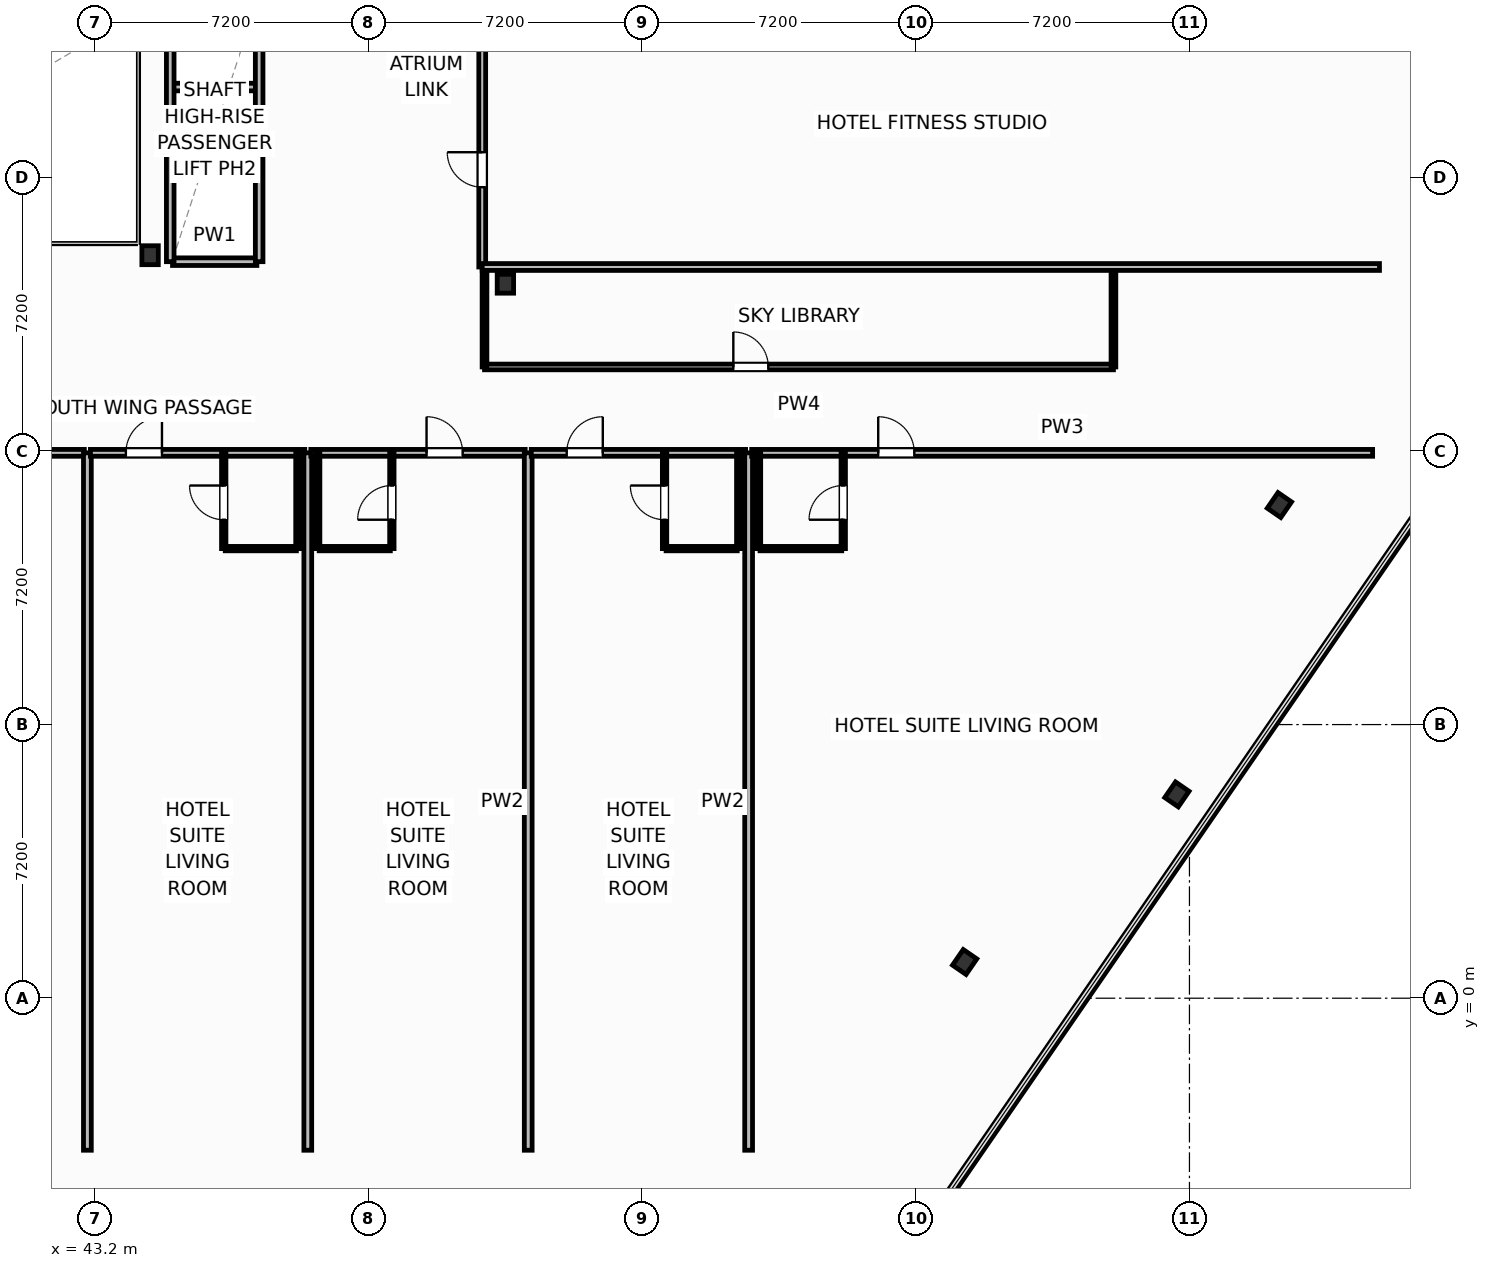
"""IFC4 building model, lengths in metres.
Left out: names, types, materials, properties, quantities, classifications, styles, units other than length and angle.
Written with IfcOpenShell. Run it as: python <this file> out.ifc"""

import sys

from ifc_helpers import new_model, si_unit, direction, frame, frame_2d, origin, origin_2d, place, context, subcontext, project, spatial, rectangle, i_section, extrude, element, fill, save


model = new_model("IFC4")
c1 = context("Model", 3, precision=1e-05, world=origin(), true_north=direction((0.0, 1.0)))
c2 = subcontext(c1, "Body", "Model", "MODEL_VIEW")
j1 = project(units=[si_unit("LENGTHUNIT", "METRE"), si_unit("PLANEANGLEUNIT", "RADIAN")], contexts=[c1])
p1 = place(None, origin())
s1 = spatial("IfcSite", under=j1, at=p1, CompositionType="ELEMENT")
p2 = place(p1, origin())
s2 = spatial("IfcBuilding", under=s1, at=p2, CompositionType="ELEMENT")
p3 = place(p2, frame((0.0, 0.0, 64.0)))
s3 = spatial("IfcBuildingStorey", under=s2, at=p3, CompositionType="ELEMENT", Elevation=64.0)
for number, where, z_axis, x_axis in (
    (1, (44.65, 19.55, 0.0), (0.0, 0.0, 1.0), (1.0, 0.0, 0.0)),
    (2, (54.0, 18.8, 0.0), (0.0, 0.0, 1.0), (1.0, 0.0, 0.0)),
    (3, (66.085, 0.953, 0.0), (0.0, 0.0, 1.0), (0.824, -0.567, 0.0)),
    (4, (71.67, 5.363, 0.0), (0.0, 0.0, 1.0), (0.824, -0.567, 0.0)),
    (5, (74.367, 12.976, 0.0), (0.0, 0.0, 1.0), (0.824, -0.567, 0.0)),
):
    element("IfcColumn", number, at=place(p3, frame(where, z_axis=z_axis, x_axis=x_axis)), inside=s3, PredefinedType="COLUMN", context=c2, shape_type="SweptSolid", body=[
        extrude(i_section(OverallWidth=0.432, OverallDepth=0.498, WebThickness=0.056, FlangeThickness=0.089, FilletRadius=0.025, at=origin_2d()), origin(), (0.0, 0.0, 1.0), 3.7),
    ])
p4 = place(p3, frame((33.518, -1.362, 0.0), z_axis=(0.0, 0.0, 1.0), x_axis=(0.82353935489, -0.567259139148, 0.0)))
e6 = element("IfcWall", 6, at=p4, inside=s3, PredefinedType="SOLIDWALL", context=c2, shape_type="SweptSolid", body=[
    extrude(rectangle(XDim=23.147, YDim=0.22, at=frame_2d((11.573, 0.0))), origin(), (0.0, 0.0, 1.0), 2.73),
])
p5 = place(p4, frame((10.749, 0.0, 0.8)))
e7 = element("IfcOpeningElement", 7, at=p5, cuts=e6, PredefinedType="OPENING", context=c2, shape_type="SweptSolid", body=[
    extrude(rectangle(XDim=1.65, YDim=1.65, at=frame_2d((0.825, 0.825))), frame((0.0, 0.12, 0.0), z_axis=(0.0, -1.0, 0.0), x_axis=(1.0, 0.0, 0.0)), (0.0, 0.0, 1.0), 0.24),
])
p6 = place(p3, frame((53.45, 16.61, 0.0), z_axis=(0.0, 0.0, 1.0), x_axis=(1.0, 0.0, 0.0)))
e8 = element("IfcWall", 8, at=p6, inside=s3, PredefinedType="PARTITIONING", context=c2, shape_type="SweptSolid", body=[
    extrude(rectangle(XDim=16.55, YDim=0.15, at=frame_2d((8.275, 0.0))), origin(), (0.0, 0.0, 1.0), 2.58),
])
p7 = place(p6, frame((6.548, 0.0, 0.0)))
e9 = element("IfcOpeningElement", 9, at=p7, cuts=e8, PredefinedType="OPENING", context=c2, shape_type="SweptSolid", body=[
    extrude(rectangle(XDim=0.92, YDim=2.05, at=frame_2d((0.46, 1.025))), frame((0.0, 0.085, 0.0), z_axis=(0.0, -1.0, 0.0), x_axis=(1.0, 0.0, 0.0)), (0.0, 0.0, 1.0), 0.17),
])
for number, where, z_axis, x_axis in (
    (10, (53.45, 16.61, 0.0), (0.0, 0.0, 1.0), (0.0, 1.0, 0.0)),
    (11, (70.0, 16.61, 0.0), (0.0, 0.0, 1.0), (0.0, 1.0, 0.0)),
):
    element("IfcWall", number, at=place(p3, frame(where, z_axis=z_axis, x_axis=x_axis)), inside=s3, PredefinedType="PARTITIONING", context=c2, shape_type="SweptSolid", body=[
        extrude(rectangle(XDim=2.63, YDim=0.125, at=frame_2d((1.315, 0.0))), origin(), (0.0, 0.0, 1.0), 3.45),
    ])
p8 = place(p3, frame((37.28, 14.35, 0.0), z_axis=(0.0, 0.0, 1.0), x_axis=(1.0, 0.0, 0.0)))
e12 = element("IfcWall", 12, at=p8, inside=s3, PredefinedType="PARTITIONING", context=c2, shape_type="SweptSolid", body=[
    extrude(rectangle(XDim=5.64, YDim=0.18, at=frame_2d((2.82, 0.0))), origin(), (0.0, 0.0, 1.0), 3.45),
])
p9 = place(p8, frame((3.045, 0.0, 0.0)))
e13 = element("IfcOpeningElement", 13, at=p9, cuts=e12, PredefinedType="OPENING", context=c2, shape_type="SweptSolid", body=[
    extrude(rectangle(XDim=0.95, YDim=2.15, at=frame_2d((0.475, 1.075))), frame((0.0, 0.1, 0.0), z_axis=(0.0, -1.0, 0.0), x_axis=(1.0, 0.0, 0.0)), (0.0, 0.0, 1.0), 0.2),
])
p10 = place(p3, frame((43.0, -4.0, 0.0), z_axis=(0.0, 0.0, 1.0), x_axis=(0.0, 1.0, 0.0)))
e14 = element("IfcWall", 14, at=p10, inside=s3, PredefinedType="PARTITIONING", context=c2, shape_type="SweptSolid", body=[
    extrude(rectangle(XDim=18.35, YDim=0.205, at=frame_2d((9.175, 0.0))), origin(), (0.0, 0.0, 1.0), 2.58),
])
p11 = place(p3, frame((43.08, 14.35, 0.0), z_axis=(0.0, 0.0, 1.0), x_axis=(1.0, 0.0, 0.0)))
e15 = element("IfcWall", 15, at=p11, inside=s3, PredefinedType="PARTITIONING", context=c2, shape_type="SweptSolid", body=[
    extrude(rectangle(XDim=5.64, YDim=0.18, at=frame_2d((2.82, 0.0))), origin(), (0.0, 0.0, 1.0), 3.45),
])
p12 = place(p11, frame((0.933, 0.0, 0.0)))
e16 = element("IfcOpeningElement", 16, at=p12, cuts=e15, PredefinedType="OPENING", context=c2, shape_type="SweptSolid", body=[
    extrude(rectangle(XDim=0.95, YDim=2.15, at=frame_2d((0.475, 1.075))), frame((0.0, 0.1, 0.0), z_axis=(0.0, -1.0, 0.0), x_axis=(1.0, 0.0, 0.0)), (0.0, 0.0, 1.0), 0.2),
])
p13 = place(p3, frame((46.628, 11.83, 0.0), z_axis=(0.0, 0.0, 1.0), x_axis=(1.0, 0.0, 0.0)))
e17 = element("IfcWall", 17, at=p13, inside=s3, PredefinedType="PARTITIONING", context=c2, shape_type="SweptSolid", body=[
    extrude(rectangle(XDim=1.872, YDim=0.115, at=frame_2d((0.936, 0.0))), origin(), (0.0, 0.0, 1.0), 3.45),
])
p14 = place(p3, frame((46.588, 11.83, 0.0), z_axis=(0.0, 0.0, 1.0), x_axis=(0.0, 1.0, 0.0)))
e18 = element("IfcWall", 18, at=p14, inside=s3, PredefinedType="PARTITIONING", context=c2, shape_type="SweptSolid", body=[
    extrude(rectangle(XDim=2.52, YDim=0.115, at=frame_2d((1.26, 0.0))), origin(), (0.0, 0.0, 1.0), 3.45),
])
p15 = place(p14, frame((0.76, 0.0, 0.0)))
e19 = element("IfcOpeningElement", 19, at=p15, cuts=e18, PredefinedType="OPENING", context=c2, shape_type="SweptSolid", body=[
    extrude(rectangle(XDim=0.9, YDim=2.05, at=frame_2d((0.45, 1.025))), frame((0.0, 0.067, 0.0), z_axis=(0.0, -1.0, 0.0), x_axis=(1.0, 0.0, 0.0)), (0.0, 0.0, 1.0), 0.135),
])
p16 = place(p3, frame((48.54, 11.83, 0.0), z_axis=(0.0, 0.0, 1.0), x_axis=(0.0, 1.0, 0.0)))
e20 = element("IfcWall", 20, at=p16, inside=s3, PredefinedType="PARTITIONING", context=c2, shape_type="SweptSolid", body=[
    extrude(rectangle(XDim=2.52, YDim=0.115, at=frame_2d((1.26, 0.0))), origin(), (0.0, 0.0, 1.0), 3.45),
])
p17 = place(p3, frame((48.8, -4.0, 0.0), z_axis=(0.0, 0.0, 1.0), x_axis=(0.0, 1.0, 0.0)))
e21 = element("IfcWall", 21, at=p17, inside=s3, PredefinedType="PARTITIONING", context=c2, shape_type="SweptSolid", body=[
    extrude(rectangle(XDim=18.35, YDim=0.205, at=frame_2d((9.175, 0.0))), origin(), (0.0, 0.0, 1.0), 3.45),
])
p18 = place(p3, frame((48.88, 14.35, 0.0), z_axis=(0.0, 0.0, 1.0), x_axis=(1.0, 0.0, 0.0)))
e22 = element("IfcWall", 22, at=p18, inside=s3, PredefinedType="PARTITIONING", context=c2, shape_type="SweptSolid", body=[
    extrude(rectangle(XDim=5.64, YDim=0.18, at=frame_2d((2.82, 0.0))), origin(), (0.0, 0.0, 1.0), 3.45),
])
p19 = place(p18, frame((3.045, 0.0, 0.0)))
e23 = element("IfcOpeningElement", 23, at=p19, cuts=e22, PredefinedType="OPENING", context=c2, shape_type="SweptSolid", body=[
    extrude(rectangle(XDim=0.95, YDim=2.15, at=frame_2d((0.475, 1.075))), frame((0.0, 0.1, 0.0), z_axis=(0.0, -1.0, 0.0), x_axis=(1.0, 0.0, 0.0)), (0.0, 0.0, 1.0), 0.2),
])
p20 = place(p3, frame((49.1, 11.83, 0.0), z_axis=(0.0, 0.0, 1.0), x_axis=(1.0, 0.0, 0.0)))
e24 = element("IfcWall", 24, at=p20, inside=s3, PredefinedType="PARTITIONING", context=c2, shape_type="SweptSolid", body=[
    extrude(rectangle(XDim=1.872, YDim=0.115, at=frame_2d((0.936, 0.0))), origin(), (0.0, 0.0, 1.0), 3.45),
])
p21 = place(p3, frame((51.012, 11.83, 0.0), z_axis=(0.0, 0.0, 1.0), x_axis=(0.0, 1.0, 0.0)))
e25 = element("IfcWall", 25, at=p21, inside=s3, PredefinedType="PARTITIONING", context=c2, shape_type="SweptSolid", body=[
    extrude(rectangle(XDim=2.52, YDim=0.115, at=frame_2d((1.26, 0.0))), origin(), (0.0, 0.0, 1.0), 3.45),
])
p22 = place(p21, frame((0.76, 0.0, 0.0)))
e26 = element("IfcOpeningElement", 26, at=p22, cuts=e25, PredefinedType="OPENING", context=c2, shape_type="SweptSolid", body=[
    extrude(rectangle(XDim=0.9, YDim=2.05, at=frame_2d((0.45, 1.025))), frame((0.0, 0.067, 0.0), z_axis=(0.0, -1.0, 0.0), x_axis=(1.0, 0.0, 0.0)), (0.0, 0.0, 1.0), 0.135),
])
p23 = place(p3, frame((49.06, 11.83, 0.0), z_axis=(0.0, 0.0, 1.0), x_axis=(0.0, 1.0, 0.0)))
e27 = element("IfcWall", 27, at=p23, inside=s3, PredefinedType="PARTITIONING", context=c2, shape_type="SweptSolid", body=[
    extrude(rectangle(XDim=2.52, YDim=0.115, at=frame_2d((1.26, 0.0))), origin(), (0.0, 0.0, 1.0), 3.45),
])
p24 = place(p3, frame((54.6, -4.0, 0.0), z_axis=(0.0, 0.0, 1.0), x_axis=(0.0, 1.0, 0.0)))
e28 = element("IfcWall", 28, at=p24, inside=s3, PredefinedType="PARTITIONING", context=c2, shape_type="SweptSolid", body=[
    extrude(rectangle(XDim=18.35, YDim=0.205, at=frame_2d((9.175, 0.0))), origin(), (0.0, 0.0, 1.0), 3.45),
])
p25 = place(p3, frame((54.68, 14.35, 0.0), z_axis=(0.0, 0.0, 1.0), x_axis=(1.0, 0.0, 0.0)))
e29 = element("IfcWall", 29, at=p25, inside=s3, PredefinedType="PARTITIONING", context=c2, shape_type="SweptSolid", body=[
    extrude(rectangle(XDim=5.64, YDim=0.18, at=frame_2d((2.82, 0.0))), origin(), (0.0, 0.0, 1.0), 3.45),
])
p26 = place(p25, frame((0.933, 0.0, 0.0)))
e30 = element("IfcOpeningElement", 30, at=p26, cuts=e29, PredefinedType="OPENING", context=c2, shape_type="SweptSolid", body=[
    extrude(rectangle(XDim=0.95, YDim=2.15, at=frame_2d((0.475, 1.075))), frame((0.0, 0.1, 0.0), z_axis=(0.0, -1.0, 0.0), x_axis=(1.0, 0.0, 0.0)), (0.0, 0.0, 1.0), 0.2),
])
p27 = place(p3, frame((58.228, 11.83, 0.0), z_axis=(0.0, 0.0, 1.0), x_axis=(1.0, 0.0, 0.0)))
e31 = element("IfcWall", 31, at=p27, inside=s3, PredefinedType="PARTITIONING", context=c2, shape_type="SweptSolid", body=[
    extrude(rectangle(XDim=1.872, YDim=0.115, at=frame_2d((0.936, 0.0))), origin(), (0.0, 0.0, 1.0), 3.45),
])
p28 = place(p3, frame((58.188, 11.83, 0.0), z_axis=(0.0, 0.0, 1.0), x_axis=(0.0, 1.0, 0.0)))
e32 = element("IfcWall", 32, at=p28, inside=s3, PredefinedType="PARTITIONING", context=c2, shape_type="SweptSolid", body=[
    extrude(rectangle(XDim=2.52, YDim=0.115, at=frame_2d((1.26, 0.0))), origin(), (0.0, 0.0, 1.0), 3.45),
])
p29 = place(p28, frame((0.76, 0.0, 0.0)))
e33 = element("IfcOpeningElement", 33, at=p29, cuts=e32, PredefinedType="OPENING", context=c2, shape_type="SweptSolid", body=[
    extrude(rectangle(XDim=0.9, YDim=2.05, at=frame_2d((0.45, 1.025))), frame((0.0, 0.067, 0.0), z_axis=(0.0, -1.0, 0.0), x_axis=(1.0, 0.0, 0.0)), (0.0, 0.0, 1.0), 0.135),
])
p30 = place(p3, frame((60.14, 11.83, 0.0), z_axis=(0.0, 0.0, 1.0), x_axis=(0.0, 1.0, 0.0)))
e34 = element("IfcWall", 34, at=p30, inside=s3, PredefinedType="PARTITIONING", context=c2, shape_type="SweptSolid", body=[
    extrude(rectangle(XDim=2.52, YDim=0.115, at=frame_2d((1.26, 0.0))), origin(), (0.0, 0.0, 1.0), 3.45),
])
p31 = place(p3, frame((60.4, -4.0, 0.0), z_axis=(0.0, 0.0, 1.0), x_axis=(0.0, 1.0, 0.0)))
e35 = element("IfcWall", 35, at=p31, inside=s3, PredefinedType="PARTITIONING", context=c2, shape_type="SweptSolid", body=[
    extrude(rectangle(XDim=18.35, YDim=0.205, at=frame_2d((9.175, 0.0))), origin(), (0.0, 0.0, 1.0), 3.45),
])
p32 = place(p3, frame((60.48, 14.35, 0.0), z_axis=(0.0, 0.0, 1.0), x_axis=(1.0, 0.0, 0.0)))
e36 = element("IfcWall", 36, at=p32, inside=s3, PredefinedType="PARTITIONING", context=c2, shape_type="SweptSolid", body=[
    extrude(rectangle(XDim=16.34, YDim=0.18, at=frame_2d((8.17, 0.0))), origin(), (0.0, 0.0, 1.0), 2.58),
])
p33 = place(p32, frame((3.33, 0.0, 0.0)))
e37 = element("IfcOpeningElement", 37, at=p33, cuts=e36, PredefinedType="OPENING", context=c2, shape_type="SweptSolid", body=[
    extrude(rectangle(XDim=0.95, YDim=2.15, at=frame_2d((0.475, 1.075))), frame((0.0, 0.1, 0.0), z_axis=(0.0, -1.0, 0.0), x_axis=(1.0, 0.0, 0.0)), (0.0, 0.0, 1.0), 0.2),
])
p34 = place(p3, frame((60.7, 11.83, 0.0), z_axis=(0.0, 0.0, 1.0), x_axis=(1.0, 0.0, 0.0)))
e38 = element("IfcWall", 38, at=p34, inside=s3, PredefinedType="PARTITIONING", context=c2, shape_type="SweptSolid", body=[
    extrude(rectangle(XDim=2.15, YDim=0.115, at=frame_2d((1.075, 0.0))), origin(), (0.0, 0.0, 1.0), 3.45),
])
p35 = place(p3, frame((62.89, 11.83, 0.0), z_axis=(0.0, 0.0, 1.0), x_axis=(0.0, 1.0, 0.0)))
e39 = element("IfcWall", 39, at=p35, inside=s3, PredefinedType="PARTITIONING", context=c2, shape_type="SweptSolid", body=[
    extrude(rectangle(XDim=2.52, YDim=0.115, at=frame_2d((1.26, 0.0))), origin(), (0.0, 0.0, 1.0), 3.45),
])
p36 = place(p35, frame((0.76, 0.0, 0.0)))
e40 = element("IfcOpeningElement", 40, at=p36, cuts=e39, PredefinedType="OPENING", context=c2, shape_type="SweptSolid", body=[
    extrude(rectangle(XDim=0.9, YDim=2.05, at=frame_2d((0.45, 1.025))), frame((0.0, 0.067, 0.0), z_axis=(0.0, -1.0, 0.0), x_axis=(1.0, 0.0, 0.0)), (0.0, 0.0, 1.0), 0.135),
])
p37 = place(p3, frame((60.66, 11.83, 0.0), z_axis=(0.0, 0.0, 1.0), x_axis=(0.0, 1.0, 0.0)))
e41 = element("IfcWall", 41, at=p37, inside=s3, PredefinedType="PARTITIONING", context=c2, shape_type="SweptSolid", body=[
    extrude(rectangle(XDim=2.52, YDim=0.115, at=frame_2d((1.26, 0.0))), origin(), (0.0, 0.0, 1.0), 3.45),
])
p38 = place(p3, frame((53.39, 19.24, 0.0), z_axis=(0.0, 0.0, 1.0), x_axis=(0.0, 1.0, 0.0)))
e42 = element("IfcWall", 42, at=p38, inside=s3, PredefinedType="PARTITIONING", context=c2, shape_type="SweptSolid", body=[
    extrude(rectangle(XDim=7.52, YDim=0.18, at=frame_2d((3.76, 0.0))), origin(), (0.0, 0.0, 1.0), 3.45),
])
p39 = place(p38, frame((2.1, 0.0, 0.0)))
e43 = element("IfcOpeningElement", 43, at=p39, cuts=e42, PredefinedType="OPENING", context=c2, shape_type="SweptSolid", body=[
    extrude(rectangle(XDim=0.92, YDim=2.05, at=frame_2d((0.46, 1.025))), frame((0.0, 0.1, 0.0), z_axis=(0.0, -1.0, 0.0), x_axis=(1.0, 0.0, 0.0)), (0.0, 0.0, 1.0), 0.2),
])
p40 = place(p3, frame((53.39, 19.24, 0.0), z_axis=(0.0, 0.0, 1.0), x_axis=(1.0, 0.0, 0.0)))
e44 = element("IfcWall", 44, at=p40, inside=s3, PredefinedType="PARTITIONING", context=c2, shape_type="SweptSolid", body=[
    extrude(rectangle(XDim=23.61, YDim=0.18, at=frame_2d((11.805, 0.0))), origin(), (0.0, 0.0, 1.0), 3.45),
])
for number, where, z_axis, x_axis in (
    (45, (45.24, 21.675, 0.0), (0.0, 0.0, 1.0), (1.0, 0.0, 0.0)),
    (46, (45.24, 23.975, 0.0), (0.0, 0.0, 1.0), (1.0, 0.0, 0.0)),
):
    element("IfcWall", number, at=place(p3, frame(where, z_axis=z_axis, x_axis=x_axis)), inside=s3, PredefinedType="PARTITIONING", context=c2, shape_type="SweptSolid", body=[
        extrude(rectangle(XDim=2.22, YDim=0.2, at=frame_2d((1.11, 0.0))), origin(), (0.0, 0.0, 1.0), 3.45),
    ])
p41 = place(p3, frame((45.24, 19.38, 0.0), z_axis=(0.0, 0.0, 1.0), x_axis=(1.0, 0.0, 0.0)))
e47 = element("IfcWall", 47, at=p41, inside=s3, PredefinedType="PARTITIONING", context=c2, shape_type="SweptSolid", body=[
    extrude(rectangle(XDim=2.22, YDim=0.2, at=frame_2d((1.11, 0.0))), origin(), (0.0, 0.0, 1.0), 2.662),
])
for number, where, z_axis, x_axis in (
    (48, (45.18, 19.38, 0.0), (0.0, 0.0, 1.0), (0.0, 1.0, 0.0)),
    (49, (47.52, 19.38, 0.0), (0.0, 0.0, 1.0), (0.0, 1.0, 0.0)),
):
    element("IfcWall", number, at=place(p3, frame(where, z_axis=z_axis, x_axis=x_axis)), inside=s3, PredefinedType="PARTITIONING", context=c2, shape_type="SweptSolid", body=[
        extrude(rectangle(XDim=6.9, YDim=0.2, at=frame_2d((3.45, 0.0))), origin(), (0.0, 0.0, 1.0), 3.45),
    ])
p42 = place(p7, origin())
e50 = element("IfcDoor", 50, at=p42, inside=s3, OperationType="SINGLE_SWING_LEFT", PredefinedType="DOOR", context=c2, shape_type="SweptSolid", body=[
    extrude(rectangle(XDim=0.92, YDim=2.05, at=frame_2d((0.46, 1.025))), frame((0.0, 0.025, 0.0), z_axis=(0.0, -1.0, 0.0), x_axis=(1.0, 0.0, 0.0)), (0.0, 0.0, 1.0), 0.05),
])
fill(e9, e50)
p43 = place(p12, origin())
e51 = element("IfcDoor", 51, at=p43, inside=s3, OperationType="SINGLE_SWING_RIGHT", PredefinedType="DOOR", context=c2, shape_type="SweptSolid", body=[
    extrude(rectangle(XDim=0.95, YDim=2.15, at=frame_2d((0.475, 1.075))), frame((0.0, 0.025, 0.0), z_axis=(0.0, -1.0, 0.0), x_axis=(1.0, 0.0, 0.0)), (0.0, 0.0, 1.0), 0.05),
])
fill(e16, e51)
p44 = place(p15, origin())
e52 = element("IfcDoor", 52, at=p44, inside=s3, OperationType="SINGLE_SWING_RIGHT", PredefinedType="DOOR", context=c2, shape_type="SweptSolid", body=[
    extrude(rectangle(XDim=0.9, YDim=2.05, at=frame_2d((0.45, 1.025))), frame((0.0, 0.025, 0.0), z_axis=(0.0, -1.0, 0.0), x_axis=(1.0, 0.0, 0.0)), (0.0, 0.0, 1.0), 0.05),
])
fill(e19, e52)
p45 = place(p19, origin())
e53 = element("IfcDoor", 53, at=p45, inside=s3, OperationType="SINGLE_SWING_LEFT", PredefinedType="DOOR", context=c2, shape_type="SweptSolid", body=[
    extrude(rectangle(XDim=0.95, YDim=2.15, at=frame_2d((0.475, 1.075))), frame((0.0, 0.025, 0.0), z_axis=(0.0, -1.0, 0.0), x_axis=(1.0, 0.0, 0.0)), (0.0, 0.0, 1.0), 0.05),
])
fill(e23, e53)
p46 = place(p22, origin())
e54 = element("IfcDoor", 54, at=p46, inside=s3, OperationType="SINGLE_SWING_LEFT", PredefinedType="DOOR", context=c2, shape_type="SweptSolid", body=[
    extrude(rectangle(XDim=0.9, YDim=2.05, at=frame_2d((0.45, 1.025))), frame((0.0, 0.025, 0.0), z_axis=(0.0, -1.0, 0.0), x_axis=(1.0, 0.0, 0.0)), (0.0, 0.0, 1.0), 0.05),
])
fill(e26, e54)
p47 = place(p26, origin())
e55 = element("IfcDoor", 55, at=p47, inside=s3, OperationType="SINGLE_SWING_RIGHT", PredefinedType="DOOR", context=c2, shape_type="SweptSolid", body=[
    extrude(rectangle(XDim=0.95, YDim=2.15, at=frame_2d((0.475, 1.075))), frame((0.0, 0.025, 0.0), z_axis=(0.0, -1.0, 0.0), x_axis=(1.0, 0.0, 0.0)), (0.0, 0.0, 1.0), 0.05),
])
fill(e30, e55)
p48 = place(p29, origin())
e56 = element("IfcDoor", 56, at=p48, inside=s3, OperationType="SINGLE_SWING_RIGHT", PredefinedType="DOOR", context=c2, shape_type="SweptSolid", body=[
    extrude(rectangle(XDim=0.9, YDim=2.05, at=frame_2d((0.45, 1.025))), frame((0.0, 0.025, 0.0), z_axis=(0.0, -1.0, 0.0), x_axis=(1.0, 0.0, 0.0)), (0.0, 0.0, 1.0), 0.05),
])
fill(e33, e56)
p49 = place(p33, origin())
e57 = element("IfcDoor", 57, at=p49, inside=s3, OperationType="SINGLE_SWING_LEFT", PredefinedType="DOOR", context=c2, shape_type="SweptSolid", body=[
    extrude(rectangle(XDim=0.95, YDim=2.15, at=frame_2d((0.475, 1.075))), frame((0.0, 0.025, 0.0), z_axis=(0.0, -1.0, 0.0), x_axis=(1.0, 0.0, 0.0)), (0.0, 0.0, 1.0), 0.05),
])
fill(e37, e57)
p50 = place(p36, origin())
e58 = element("IfcDoor", 58, at=p50, inside=s3, OperationType="SINGLE_SWING_LEFT", PredefinedType="DOOR", context=c2, shape_type="SweptSolid", body=[
    extrude(rectangle(XDim=0.9, YDim=2.05, at=frame_2d((0.45, 1.025))), frame((0.0, 0.025, 0.0), z_axis=(0.0, -1.0, 0.0), x_axis=(1.0, 0.0, 0.0)), (0.0, 0.0, 1.0), 0.05),
])
fill(e40, e58)
p51 = place(p39, origin())
e59 = element("IfcDoor", 59, at=p51, inside=s3, OperationType="SINGLE_SWING_RIGHT", PredefinedType="DOOR", context=c2, shape_type="SweptSolid", body=[
    extrude(rectangle(XDim=0.92, YDim=2.05, at=frame_2d((0.46, 1.025))), frame((0.0, 0.025, 0.0), z_axis=(0.0, -1.0, 0.0), x_axis=(1.0, 0.0, 0.0)), (0.0, 0.0, 1.0), 0.05),
])
fill(e43, e59)
save(model, sys.argv[1])
